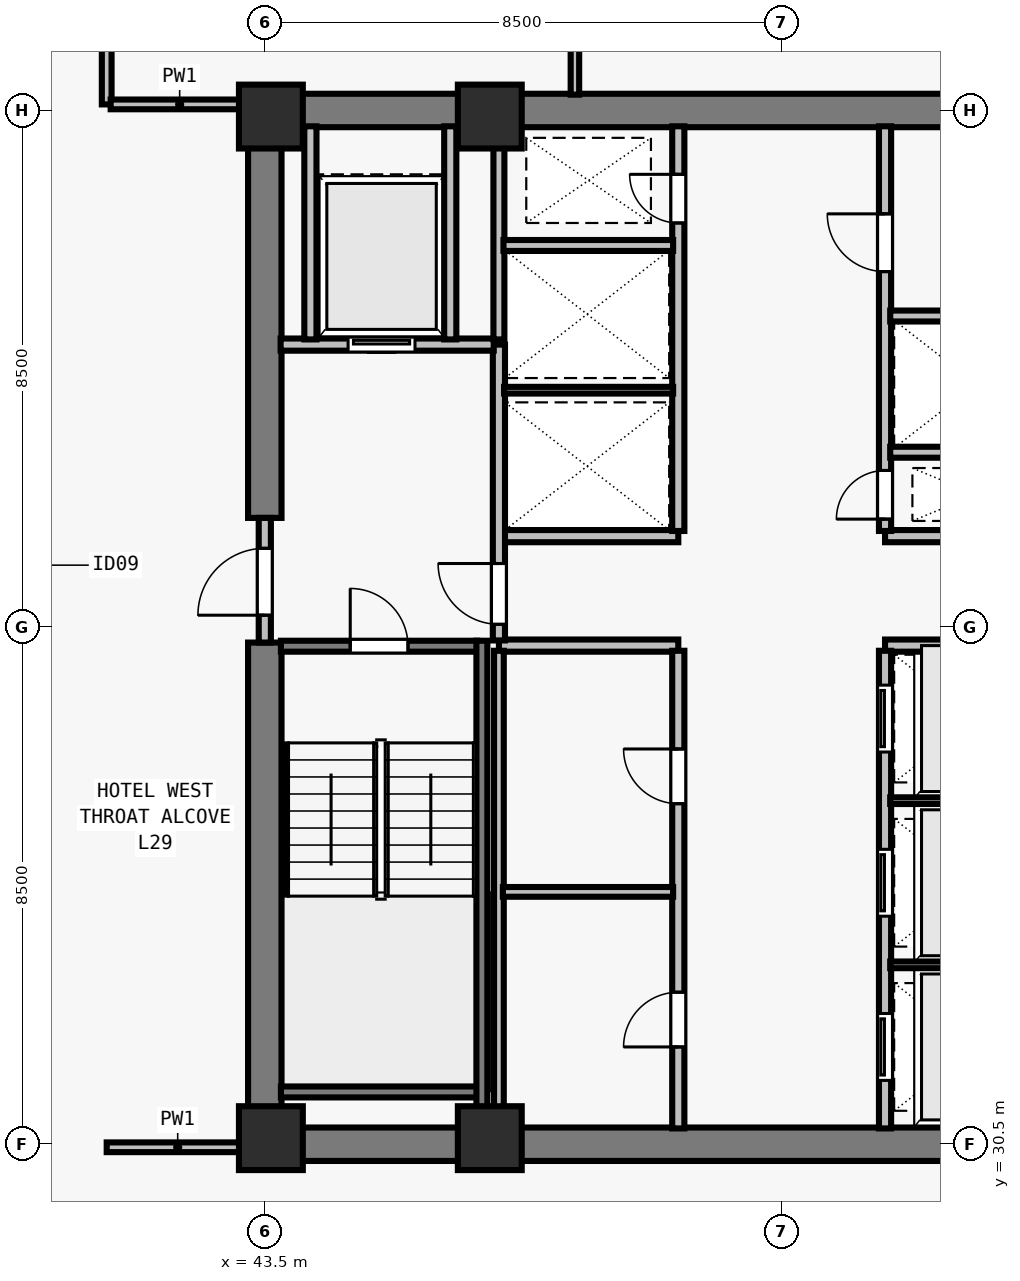
"""IFC4 building model, lengths in metres.
Left out: names, types, materials, properties, quantities, classifications, styles, units other than length and angle.
Written with IfcOpenShell. Run it as: python <this file> out.ifc"""

import sys

from ifc_helpers import new_model, si_unit, direction, frame, frame_2d, origin, origin_2d, place, context, subcontext, project, spatial, rectangle, extrude, element, fill, save


model = new_model("IFC4")
c1 = context("Model", 3, precision=1e-05, world=origin(), true_north=direction((0.0, 1.0)))
c2 = subcontext(c1, "Body", "Model", "MODEL_VIEW")
j1 = project(units=[si_unit("LENGTHUNIT", "METRE"), si_unit("PLANEANGLEUNIT", "RADIAN")], contexts=[c1])
p1 = place(None, origin())
s1 = spatial("IfcSite", under=j1, at=p1, CompositionType="ELEMENT")
p2 = place(p1, origin())
s2 = spatial("IfcBuilding", under=s1, at=p2, CompositionType="ELEMENT")
p3 = place(p2, frame((0.0, 0.0, 109.5)))
s3 = spatial("IfcBuildingStorey", under=s2, at=p3, CompositionType="ELEMENT", Elevation=109.5)
for number, where, z_axis, x_axis in (
    (1, (43.6, 30.6, 0.0), (0.0, 0.0, 1.0), (1.0, 0.0, 0.0)),
    (2, (47.2, 30.6, 0.0), (0.0, 0.0, 1.0), (1.0, 0.0, 0.0)),
    (3, (43.6, 47.4, 0.0), (0.0, 0.0, 1.0), (1.0, 0.0, 0.0)),
    (4, (47.2, 47.4, 0.0), (0.0, 0.0, 1.0), (1.0, 0.0, 0.0)),
):
    element("IfcColumn", number, at=place(p3, frame(where, z_axis=z_axis, x_axis=x_axis)), inside=s3, PredefinedType="COLUMN", context=c2, shape_type="SweptSolid", body=[
        extrude(rectangle(XDim=1.05, YDim=1.05, at=origin_2d()), origin(), (0.0, 0.0, 1.0), 3.5),
    ])
for number, where, z_axis, x_axis in (
    (5, (43.225, 30.5, 0.0), (0.0, 0.0, 1.0), (1.0, 0.0, 0.0)),
    (6, (43.225, 47.5, 0.0), (0.0, 0.0, 1.0), (1.0, 0.0, 0.0)),
):
    element("IfcWall", number, at=place(p3, frame(where, z_axis=z_axis, x_axis=x_axis)), inside=s3, PredefinedType="SHEAR", context=c2, shape_type="SweptSolid", body=[
        extrude(rectangle(XDim=17.55, YDim=0.55, at=frame_2d((8.775, 0.0))), origin(), (0.0, 0.0, 1.0), 3.28),
    ])
p4 = place(p3, frame((43.5, 30.765, 0.0), z_axis=(0.0, 0.0, 1.0), x_axis=(0.0, 1.0, 0.0)))
e7 = element("IfcWall", 7, at=p4, inside=s3, PredefinedType="SHEAR", context=c2, shape_type="SweptSolid", body=[
    extrude(rectangle(XDim=7.985, YDim=0.55, at=frame_2d((3.993, 0.0))), origin(), (0.0, 0.0, 1.0), 3.28),
])
p5 = place(p3, frame((43.5, 40.8, 0.0), z_axis=(0.0, 0.0, 1.0), x_axis=(0.0, 1.0, 0.0)))
e8 = element("IfcWall", 8, at=p5, inside=s3, PredefinedType="SHEAR", context=c2, shape_type="SweptSolid", body=[
    extrude(rectangle(XDim=6.435, YDim=0.55, at=frame_2d((3.218, 0.0))), origin(), (0.0, 0.0, 1.0), 3.28),
])
for number, where, z_axis, x_axis in (
    (9, (47.35, 38.7, 0.0), (0.0, 0.0, 1.0), (1.0, 0.0, 0.0)),
    (10, (47.35, 40.5, 0.0), (0.0, 0.0, 1.0), (1.0, 0.0, 0.0)),
    (11, (53.7, 38.7, 0.0), (0.0, 0.0, 1.0), (1.0, 0.0, 0.0)),
    (12, (53.7, 40.5, 0.0), (0.0, 0.0, 1.0), (1.0, 0.0, 0.0)),
):
    element("IfcWall", number, at=place(p3, frame(where, z_axis=z_axis, x_axis=x_axis)), inside=s3, PredefinedType="SOLIDWALL", context=c2, shape_type="SweptSolid", body=[
        extrude(rectangle(XDim=2.95, YDim=0.2, at=frame_2d((1.475, 0.0))), origin(), (0.0, 0.0, 1.0), 3.28),
    ])
p6 = place(p3, frame((50.3, 30.76, 0.0), z_axis=(0.0, 0.0, 1.0), x_axis=(0.0, 1.0, 0.0)))
e13 = element("IfcWall", 13, at=p6, inside=s3, PredefinedType="SOLIDWALL", context=c2, shape_type="SweptSolid", body=[
    extrude(rectangle(XDim=7.855, YDim=0.2, at=frame_2d((3.927, 0.0))), origin(), (0.0, 0.0, 1.0), 3.28),
])
p7 = place(p6, frame((1.34, 0.0, 0.0)))
e14 = element("IfcOpeningElement", 14, at=p7, cuts=e13, PredefinedType="OPENING", context=c2, shape_type="SweptSolid", body=[
    extrude(rectangle(XDim=0.9, YDim=2.12, at=frame_2d((0.45, 1.06))), frame((0.0, 0.11, 0.0), z_axis=(0.0, -1.0, 0.0), x_axis=(1.0, 0.0, 0.0)), (0.0, 0.0, 1.0), 0.22),
])
p8 = place(p6, frame((5.34, 0.0, 0.0)))
e15 = element("IfcOpeningElement", 15, at=p8, cuts=e13, PredefinedType="OPENING", context=c2, shape_type="SweptSolid", body=[
    extrude(rectangle(XDim=0.9, YDim=2.12, at=frame_2d((0.45, 1.06))), frame((0.0, 0.11, 0.0), z_axis=(0.0, -1.0, 0.0), x_axis=(1.0, 0.0, 0.0)), (0.0, 0.0, 1.0), 0.22),
])
p9 = place(p3, frame((53.7, 30.76, 0.0), z_axis=(0.0, 0.0, 1.0), x_axis=(0.0, 1.0, 0.0)))
e16 = element("IfcWall", 16, at=p9, inside=s3, PredefinedType="SOLIDWALL", context=c2, shape_type="SweptSolid", body=[
    extrude(rectangle(XDim=7.855, YDim=0.2, at=frame_2d((3.927, 0.0))), origin(), (0.0, 0.0, 1.0), 3.28),
])
p10 = place(p9, frame((0.79, 0.0, 0.0)))
e17 = element("IfcOpeningElement", 17, at=p10, cuts=e16, PredefinedType="OPENING", context=c2, shape_type="SweptSolid", body=[
    extrude(rectangle(XDim=1.1, YDim=2.2, at=frame_2d((0.55, 1.1))), frame((0.0, 0.11, 0.0), z_axis=(0.0, -1.0, 0.0), x_axis=(1.0, 0.0, 0.0)), (0.0, 0.0, 1.0), 0.22),
])
p11 = place(p9, frame((3.49, 0.0, 0.0)))
e18 = element("IfcOpeningElement", 18, at=p11, cuts=e16, PredefinedType="OPENING", context=c2, shape_type="SweptSolid", body=[
    extrude(rectangle(XDim=1.1, YDim=2.2, at=frame_2d((0.55, 1.1))), frame((0.0, 0.11, 0.0), z_axis=(0.0, -1.0, 0.0), x_axis=(1.0, 0.0, 0.0)), (0.0, 0.0, 1.0), 0.22),
])
p12 = place(p9, frame((6.19, 0.0, 0.0)))
e19 = element("IfcOpeningElement", 19, at=p12, cuts=e16, PredefinedType="OPENING", context=c2, shape_type="SweptSolid", body=[
    extrude(rectangle(XDim=1.1, YDim=2.2, at=frame_2d((0.55, 1.1))), frame((0.0, 0.11, 0.0), z_axis=(0.0, -1.0, 0.0), x_axis=(1.0, 0.0, 0.0)), (0.0, 0.0, 1.0), 0.22),
])
p13 = place(p3, frame((50.3, 40.585, 0.0), z_axis=(0.0, 0.0, 1.0), x_axis=(0.0, 1.0, 0.0)))
e20 = element("IfcWall", 20, at=p13, inside=s3, PredefinedType="SOLIDWALL", context=c2, shape_type="SweptSolid", body=[
    extrude(rectangle(XDim=6.655, YDim=0.2, at=frame_2d((3.328, 0.0))), origin(), (0.0, 0.0, 1.0), 3.28),
])
p14 = place(p13, frame((5.065, 0.0, 0.0)))
e21 = element("IfcOpeningElement", 21, at=p14, cuts=e20, PredefinedType="OPENING", context=c2, shape_type="SweptSolid", body=[
    extrude(rectangle(XDim=0.8, YDim=2.08, at=frame_2d((0.4, 1.04))), frame((0.0, 0.11, 0.0), z_axis=(0.0, -1.0, 0.0), x_axis=(1.0, 0.0, 0.0)), (0.0, 0.0, 1.0), 0.22),
])
p15 = place(p3, frame((53.7, 40.585, 0.0), z_axis=(0.0, 0.0, 1.0), x_axis=(0.0, 1.0, 0.0)))
e22 = element("IfcWall", 22, at=p15, inside=s3, PredefinedType="SOLIDWALL", context=c2, shape_type="SweptSolid", body=[
    extrude(rectangle(XDim=6.655, YDim=0.2, at=frame_2d((3.328, 0.0))), origin(), (0.0, 0.0, 1.0), 3.28),
])
p16 = place(p15, frame((0.195, 0.0, 0.0)))
e23 = element("IfcOpeningElement", 23, at=p16, cuts=e22, PredefinedType="OPENING", context=c2, shape_type="SweptSolid", body=[
    extrude(rectangle(XDim=0.8, YDim=2.08, at=frame_2d((0.4, 1.04))), frame((0.0, 0.11, 0.0), z_axis=(0.0, -1.0, 0.0), x_axis=(1.0, 0.0, 0.0)), (0.0, 0.0, 1.0), 0.22),
])
p17 = place(p15, frame((4.265, 0.0, 0.0)))
e24 = element("IfcOpeningElement", 24, at=p17, cuts=e22, PredefinedType="OPENING", context=c2, shape_type="SweptSolid", body=[
    extrude(rectangle(XDim=0.95, YDim=2.12, at=frame_2d((0.475, 1.06))), frame((0.0, 0.11, 0.0), z_axis=(0.0, -1.0, 0.0), x_axis=(1.0, 0.0, 0.0)), (0.0, 0.0, 1.0), 0.22),
])
p18 = place(p3, frame((43.5, 38.75, 0.0), z_axis=(0.0, 0.0, 1.0), x_axis=(0.0, 1.0, 0.0)))
e25 = element("IfcWall", 25, at=p18, inside=s3, PredefinedType="SOLIDWALL", context=c2, shape_type="SweptSolid", body=[
    extrude(rectangle(XDim=2.05, YDim=0.2, at=frame_2d((1.025, 0.0))), origin(), (0.0, 0.0, 1.0), 3.28),
])
p19 = place(p18, frame((0.45, 0.0, 0.0)))
e26 = element("IfcOpeningElement", 26, at=p19, cuts=e25, PredefinedType="OPENING", context=c2, shape_type="SweptSolid", body=[
    extrude(rectangle(XDim=1.1, YDim=2.15, at=frame_2d((0.55, 1.075))), frame((0.0, 0.11, 0.0), z_axis=(0.0, -1.0, 0.0), x_axis=(1.0, 0.0, 0.0)), (0.0, 0.0, 1.0), 0.22),
])
p20 = place(p3, frame((47.35, 38.785, 0.0), z_axis=(0.0, 0.0, 1.0), x_axis=(0.0, 1.0, 0.0)))
e27 = element("IfcWall", 27, at=p20, inside=s3, PredefinedType="SOLIDWALL", context=c2, shape_type="SweptSolid", body=[
    extrude(rectangle(XDim=4.865, YDim=0.2, at=frame_2d((2.433, 0.0))), origin(), (0.0, 0.0, 1.0), 3.28),
])
p21 = place(p20, frame((0.265, 0.0, 0.0)))
e28 = element("IfcOpeningElement", 28, at=p21, cuts=e27, PredefinedType="OPENING", context=c2, shape_type="SweptSolid", body=[
    extrude(rectangle(XDim=1.0, YDim=2.15, at=frame_2d((0.5, 1.075))), frame((0.0, 0.11, 0.0), z_axis=(0.0, -1.0, 0.0), x_axis=(1.0, 0.0, 0.0)), (0.0, 0.0, 1.0), 0.22),
])
p22 = place(p3, frame((43.76, 43.65, 0.0), z_axis=(0.0, 0.0, 1.0), x_axis=(1.0, 0.0, 0.0)))
e29 = element("IfcWall", 29, at=p22, inside=s3, PredefinedType="SOLIDWALL", context=c2, shape_type="SweptSolid", body=[
    extrude(rectangle(XDim=3.505, YDim=0.2, at=frame_2d((1.752, 0.0))), origin(), (0.0, 0.0, 1.0), 3.28),
])
p23 = place(p22, frame((1.11, 0.0, 0.0)))
e30 = element("IfcOpeningElement", 30, at=p23, cuts=e29, PredefinedType="OPENING", context=c2, shape_type="SweptSolid", body=[
    extrude(rectangle(XDim=1.1, YDim=2.2, at=frame_2d((0.55, 1.1))), frame((0.0, 0.11, 0.0), z_axis=(0.0, -1.0, 0.0), x_axis=(1.0, 0.0, 0.0)), (0.0, 0.0, 1.0), 0.22),
])
for number, where, z_axis, x_axis in (
    (31, (46.55, 43.735, 0.0), (0.0, 0.0, 1.0), (0.0, 1.0, 0.0)),
    (32, (44.25, 43.735, 0.0), (0.0, 0.0, 1.0), (0.0, 1.0, 0.0)),
):
    element("IfcWall", number, at=place(p3, frame(where, z_axis=z_axis, x_axis=x_axis)), inside=s3, PredefinedType="SOLIDWALL", context=c2, shape_type="SweptSolid", body=[
        extrude(rectangle(XDim=3.505, YDim=0.2, at=frame_2d((1.752, 0.0))), origin(), (0.0, 0.0, 1.0), 3.28),
    ])
p24 = place(p3, frame((47.35, 30.76, 0.0), z_axis=(0.0, 0.0, 1.0), x_axis=(0.0, 1.0, 0.0)))
e33 = element("IfcWall", 33, at=p24, inside=s3, PredefinedType="PARTITIONING", context=c2, shape_type="SweptSolid", body=[
    extrude(rectangle(XDim=7.855, YDim=0.16, at=frame_2d((3.927, 0.0))), origin(), (0.0, 0.0, 1.0), 3.28),
])
p25 = place(p3, frame((47.415, 34.65, 0.0), z_axis=(0.0, 0.0, 1.0), x_axis=(1.0, 0.0, 0.0)))
e34 = element("IfcWall", 34, at=p25, inside=s3, PredefinedType="PARTITIONING", context=c2, shape_type="SweptSolid", body=[
    extrude(rectangle(XDim=2.8, YDim=0.16, at=frame_2d((1.4, 0.0))), origin(), (0.0, 0.0, 1.0), 3.28),
])
for number, where, z_axis, x_axis in (
    (35, (53.785, 33.45, 0.0), (0.0, 0.0, 1.0), (1.0, 0.0, 0.0)),
    (36, (53.785, 36.15, 0.0), (0.0, 0.0, 1.0), (1.0, 0.0, 0.0)),
):
    element("IfcWall", number, at=place(p3, frame(where, z_axis=z_axis, x_axis=x_axis)), inside=s3, PredefinedType="PARTITIONING", context=c2, shape_type="SweptSolid", body=[
        extrude(rectangle(XDim=2.79, YDim=0.11, at=frame_2d((1.395, 0.0))), origin(), (0.0, 0.0, 1.0), 3.28),
    ])
p26 = place(p3, frame((47.35, 43.735, 0.0), z_axis=(0.0, 0.0, 1.0), x_axis=(0.0, 1.0, 0.0)))
e37 = element("IfcWall", 37, at=p26, inside=s3, PredefinedType="SOLIDWALL", context=c2, shape_type="SweptSolid", body=[
    extrude(rectangle(XDim=3.505, YDim=0.18, at=frame_2d((1.752, 0.0))), origin(), (0.0, 0.0, 1.0), 3.28),
])
p27 = place(p3, frame((47.435, 42.9, 0.0), z_axis=(0.0, 0.0, 1.0), x_axis=(1.0, 0.0, 0.0)))
e38 = element("IfcWall", 38, at=p27, inside=s3, PredefinedType="PARTITIONING", context=c2, shape_type="SweptSolid", body=[
    extrude(rectangle(XDim=2.78, YDim=0.11, at=frame_2d((1.39, 0.0))), origin(), (0.0, 0.0, 1.0), 3.28),
])
p28 = place(p3, frame((47.425, 45.28, 0.0), z_axis=(0.0, 0.0, 1.0), x_axis=(1.0, 0.0, 0.0)))
e39 = element("IfcWall", 39, at=p28, inside=s3, PredefinedType="SOLIDWALL", context=c2, shape_type="SweptSolid", body=[
    extrude(rectangle(XDim=2.79, YDim=0.18, at=frame_2d((1.395, 0.0))), origin(), (0.0, 0.0, 1.0), 3.28),
])
p29 = place(p3, frame((53.785, 41.88, 0.0), z_axis=(0.0, 0.0, 1.0), x_axis=(1.0, 0.0, 0.0)))
e40 = element("IfcWall", 40, at=p29, inside=s3, PredefinedType="SOLIDWALL", context=c2, shape_type="SweptSolid", body=[
    extrude(rectangle(XDim=2.78, YDim=0.18, at=frame_2d((1.39, 0.0))), origin(), (0.0, 0.0, 1.0), 3.28),
])
p30 = place(p3, frame((53.785, 44.12, 0.0), z_axis=(0.0, 0.0, 1.0), x_axis=(1.0, 0.0, 0.0)))
e41 = element("IfcWall", 41, at=p30, inside=s3, PredefinedType="SOLIDWALL", context=c2, shape_type="SweptSolid", body=[
    extrude(rectangle(XDim=2.79, YDim=0.18, at=frame_2d((1.395, 0.0))), origin(), (0.0, 0.0, 1.0), 3.28),
])
p31 = place(p3, frame((40.9, 47.6, 0.0), z_axis=(0.0, 0.0, 1.0), x_axis=(0.0, 1.0, 0.0)))
e42 = element("IfcWall", 42, at=p31, inside=s3, PredefinedType="PARTITIONING", context=c2, shape_type="SweptSolid", body=[
    extrude(rectangle(XDim=15.075, YDim=0.16, at=frame_2d((7.538, 0.0))), origin(), (0.0, 0.0, 1.0), 2.555),
])
p32 = place(p31, frame((3.5, 0.0, 0.0)))
e43 = element("IfcOpeningElement", 43, at=p32, cuts=e42, PredefinedType="OPENING", context=c2, shape_type="SweptSolid", body=[
    extrude(rectangle(XDim=0.96, YDim=2.12, at=frame_2d((0.48, 1.06))), frame((0.0, 0.09, 0.0), z_axis=(0.0, -1.0, 0.0), x_axis=(1.0, 0.0, 0.0)), (0.0, 0.0, 1.0), 0.18),
])
p33 = place(p3, frame((40.9, 30.45, 0.0), z_axis=(0.0, 0.0, 1.0), x_axis=(1.0, 0.0, 0.0)))
e44 = element("IfcWall", 44, at=p33, inside=s3, PredefinedType="PARTITIONING", context=c2, shape_type="SweptSolid", body=[
    extrude(rectangle(XDim=2.335, YDim=0.16, at=frame_2d((1.167, 0.0))), origin(), (0.0, 0.0, 1.0), 3.28),
])
p34 = place(p3, frame((40.965, 47.6, 0.0), z_axis=(0.0, 0.0, 1.0), x_axis=(1.0, 0.0, 0.0)))
e45 = element("IfcWall", 45, at=p34, inside=s3, PredefinedType="PARTITIONING", context=c2, shape_type="SweptSolid", body=[
    extrude(rectangle(XDim=2.27, YDim=0.16, at=frame_2d((1.135, 0.0))), origin(), (0.0, 0.0, 1.0), 3.28),
])
p35 = place(p3, frame((48.6, 47.76, 0.0), z_axis=(0.0, 0.0, 1.0), x_axis=(0.0, 1.0, 0.0)))
e46 = element("IfcWall", 46, at=p35, inside=s3, PredefinedType="PARTITIONING", context=c2, shape_type="SweptSolid", body=[
    extrude(rectangle(XDim=14.915, YDim=0.14, at=frame_2d((7.458, 0.0))), origin(), (0.0, 0.0, 1.0), 2.896),
])
p36 = place(p35, frame((2.34, 0.0, 0.0)))
e47 = element("IfcOpeningElement", 47, at=p36, cuts=e46, PredefinedType="OPENING", context=c2, shape_type="SweptSolid", body=[
    extrude(rectangle(XDim=0.96, YDim=2.12, at=frame_2d((0.48, 1.06))), frame((0.0, 0.08, 0.0), z_axis=(0.0, -1.0, 0.0), x_axis=(1.0, 0.0, 0.0)), (0.0, 0.0, 1.0), 0.16),
])
p37 = place(p3, frame((43.765, 38.69, 0.0), z_axis=(0.0, 0.0, 1.0), x_axis=(1.0, 0.0, 0.0)))
e48 = element("IfcWall", 48, at=p37, inside=s3, PredefinedType="SOLIDWALL", context=c2, shape_type="SweptSolid", body=[
    extrude(rectangle(XDim=3.23, YDim=0.18, at=frame_2d((1.615, 0.0))), origin(), (0.0, 0.0, 1.0), 3.28),
])
p38 = place(p37, frame((1.14, 0.0, 0.0)))
e49 = element("IfcOpeningElement", 49, at=p38, cuts=e48, PredefinedType="OPENING", context=c2, shape_type="SweptSolid", body=[
    extrude(rectangle(XDim=0.95, YDim=2.15, at=frame_2d((0.475, 1.075))), frame((0.0, 0.1, 0.0), z_axis=(0.0, -1.0, 0.0), x_axis=(1.0, 0.0, 0.0)), (0.0, 0.0, 1.0), 0.2),
])
p39 = place(p3, frame((43.765, 31.36, 0.0), z_axis=(0.0, 0.0, 1.0), x_axis=(1.0, 0.0, 0.0)))
e50 = element("IfcWall", 50, at=p39, inside=s3, PredefinedType="SOLIDWALL", context=c2, shape_type="SweptSolid", body=[
    extrude(rectangle(XDim=3.23, YDim=0.18, at=frame_2d((1.615, 0.0))), origin(), (0.0, 0.0, 1.0), 3.28),
])
p40 = place(p3, frame((47.07, 38.78, 0.0), z_axis=(0.0, 0.0, 1.0), x_axis=(0.0, -1.0, 0.0)))
e51 = element("IfcWall", 51, at=p40, inside=s3, PredefinedType="SOLIDWALL", context=c2, shape_type="SweptSolid", body=[
    extrude(rectangle(XDim=8.017, YDim=0.18, at=frame_2d((4.009, 0.0))), origin(), (0.0, 0.0, 1.0), 3.28),
])
p41 = place(p19, origin())
e52 = element("IfcDoor", 52, at=p41, inside=s3, OperationType="SINGLE_SWING_LEFT", PredefinedType="DOOR", context=c2, shape_type="SweptSolid", body=[
    extrude(rectangle(XDim=1.1, YDim=2.15, at=frame_2d((0.55, 1.075))), frame((0.0, 0.025, 0.0), z_axis=(0.0, -1.0, 0.0), x_axis=(1.0, 0.0, 0.0)), (0.0, 0.0, 1.0), 0.05),
])
fill(e26, e52)
p42 = place(p21, origin())
e53 = element("IfcDoor", 53, at=p42, inside=s3, OperationType="SINGLE_SWING_RIGHT", PredefinedType="DOOR", context=c2, shape_type="SweptSolid", body=[
    extrude(rectangle(XDim=1.0, YDim=2.15, at=frame_2d((0.5, 1.075))), frame((0.0, 0.025, 0.0), z_axis=(0.0, -1.0, 0.0), x_axis=(1.0, 0.0, 0.0)), (0.0, 0.0, 1.0), 0.05),
])
fill(e28, e53)
p43 = place(p23, origin())
e54 = element("IfcDoor", 54, at=p43, inside=s3, OperationType="SLIDING_TO_LEFT", PredefinedType="DOOR", context=c2, shape_type="SweptSolid", body=[
    extrude(rectangle(XDim=1.1, YDim=2.2, at=frame_2d((0.55, 1.1))), frame((0.0, 0.025, 0.0), z_axis=(0.0, -1.0, 0.0), x_axis=(1.0, 0.0, 0.0)), (0.0, 0.0, 1.0), 0.05),
])
fill(e30, e54)
p44 = place(p7, origin())
e55 = element("IfcDoor", 55, at=p44, inside=s3, OperationType="SINGLE_SWING_LEFT", PredefinedType="DOOR", context=c2, shape_type="SweptSolid", body=[
    extrude(rectangle(XDim=0.9, YDim=2.12, at=frame_2d((0.45, 1.06))), frame((0.0, 0.025, 0.0), z_axis=(0.0, -1.0, 0.0), x_axis=(1.0, 0.0, 0.0)), (0.0, 0.0, 1.0), 0.05),
])
fill(e14, e55)
p45 = place(p8, origin())
e56 = element("IfcDoor", 56, at=p45, inside=s3, OperationType="SINGLE_SWING_RIGHT", PredefinedType="DOOR", context=c2, shape_type="SweptSolid", body=[
    extrude(rectangle(XDim=0.9, YDim=2.12, at=frame_2d((0.45, 1.06))), frame((0.0, 0.025, 0.0), z_axis=(0.0, -1.0, 0.0), x_axis=(1.0, 0.0, 0.0)), (0.0, 0.0, 1.0), 0.05),
])
fill(e15, e56)
p46 = place(p10, origin())
e57 = element("IfcDoor", 57, at=p46, inside=s3, OperationType="SLIDING_TO_LEFT", PredefinedType="DOOR", context=c2, shape_type="SweptSolid", body=[
    extrude(rectangle(XDim=1.1, YDim=2.2, at=frame_2d((0.55, 1.1))), frame((0.0, 0.025, 0.0), z_axis=(0.0, -1.0, 0.0), x_axis=(1.0, 0.0, 0.0)), (0.0, 0.0, 1.0), 0.05),
])
fill(e17, e57)
p47 = place(p11, origin())
e58 = element("IfcDoor", 58, at=p47, inside=s3, OperationType="SLIDING_TO_LEFT", PredefinedType="DOOR", context=c2, shape_type="SweptSolid", body=[
    extrude(rectangle(XDim=1.1, YDim=2.2, at=frame_2d((0.55, 1.1))), frame((0.0, 0.025, 0.0), z_axis=(0.0, -1.0, 0.0), x_axis=(1.0, 0.0, 0.0)), (0.0, 0.0, 1.0), 0.05),
])
fill(e18, e58)
p48 = place(p12, origin())
e59 = element("IfcDoor", 59, at=p48, inside=s3, OperationType="SLIDING_TO_LEFT", PredefinedType="DOOR", context=c2, shape_type="SweptSolid", body=[
    extrude(rectangle(XDim=1.1, YDim=2.2, at=frame_2d((0.55, 1.1))), frame((0.0, 0.025, 0.0), z_axis=(0.0, -1.0, 0.0), x_axis=(1.0, 0.0, 0.0)), (0.0, 0.0, 1.0), 0.05),
])
fill(e19, e59)
p49 = place(p14, origin())
e60 = element("IfcDoor", 60, at=p49, inside=s3, OperationType="SINGLE_SWING_RIGHT", PredefinedType="DOOR", context=c2, shape_type="SweptSolid", body=[
    extrude(rectangle(XDim=0.8, YDim=2.08, at=frame_2d((0.4, 1.04))), frame((0.0, 0.025, 0.0), z_axis=(0.0, -1.0, 0.0), x_axis=(1.0, 0.0, 0.0)), (0.0, 0.0, 1.0), 0.05),
])
fill(e21, e60)
p50 = place(p16, origin())
e61 = element("IfcDoor", 61, at=p50, inside=s3, OperationType="SINGLE_SWING_LEFT", PredefinedType="DOOR", context=c2, shape_type="SweptSolid", body=[
    extrude(rectangle(XDim=0.8, YDim=2.08, at=frame_2d((0.4, 1.04))), frame((0.0, 0.025, 0.0), z_axis=(0.0, -1.0, 0.0), x_axis=(1.0, 0.0, 0.0)), (0.0, 0.0, 1.0), 0.05),
])
fill(e23, e61)
p51 = place(p17, origin())
e62 = element("IfcDoor", 62, at=p51, inside=s3, OperationType="SINGLE_SWING_RIGHT", PredefinedType="DOOR", context=c2, shape_type="SweptSolid", body=[
    extrude(rectangle(XDim=0.95, YDim=2.12, at=frame_2d((0.475, 1.06))), frame((0.0, 0.025, 0.0), z_axis=(0.0, -1.0, 0.0), x_axis=(1.0, 0.0, 0.0)), (0.0, 0.0, 1.0), 0.05),
])
fill(e24, e62)
p52 = place(p38, origin())
e63 = element("IfcDoor", 63, at=p52, inside=s3, OperationType="SINGLE_SWING_LEFT", PredefinedType="DOOR", context=c2, shape_type="SweptSolid", body=[
    extrude(rectangle(XDim=0.95, YDim=2.15, at=frame_2d((0.475, 1.075))), frame((0.0, 0.025, 0.0), z_axis=(0.0, -1.0, 0.0), x_axis=(1.0, 0.0, 0.0)), (0.0, 0.0, 1.0), 0.05),
])
fill(e49, e63)
save(model, sys.argv[1])
